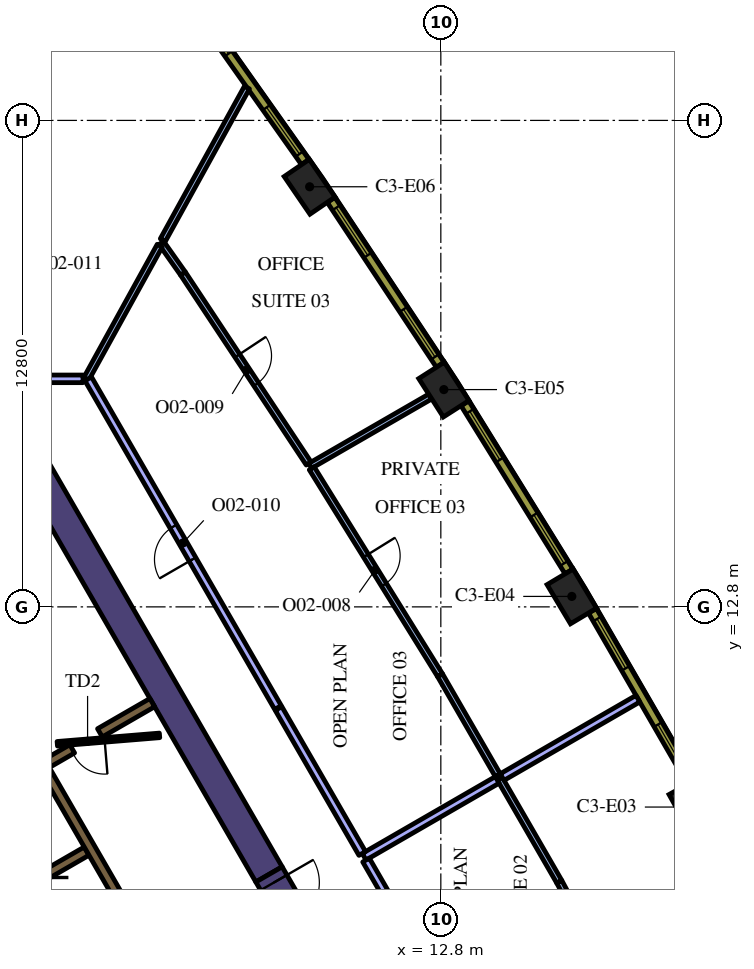
"""IFC4 building model, lengths in metres.
Left out: names, types, materials, properties, quantities, classifications, styles, units other than length and angle.
Written with IfcOpenShell. Run it as: python <this file> out.ifc"""

import sys

from ifc_helpers import new_model, si_unit, direction, frame, frame_2d, origin, origin_2d, place, context, subcontext, project, spatial, rectangle, extrude, element, fill, save


model = new_model("IFC4")
c1 = context("Model", 3, precision=1e-05, world=origin(), true_north=direction((0.0, 1.0)))
c2 = subcontext(c1, "Body", "Model", "MODEL_VIEW")
j1 = project(units=[si_unit("LENGTHUNIT", "METRE"), si_unit("PLANEANGLEUNIT", "RADIAN")], contexts=[c1])
p1 = place(None, origin())
s1 = spatial("IfcSite", under=j1, at=p1, CompositionType="ELEMENT")
p2 = place(p1, origin())
s2 = spatial("IfcBuilding", under=s1, at=p2, CompositionType="ELEMENT")
p3 = place(p2, frame((0.0, 0.0, 154.2)))
s3 = spatial("IfcBuildingStorey", under=s2, at=p3, CompositionType="ELEMENT", Elevation=154.2)
for number, where, z_axis, x_axis in (
    (1, (19.447, 7.533, 0.0), (0.0, 0.0, 1.0), (-0.487, 0.874, 0.0)),
    (2, (16.247, 13.075, 0.0), (0.0, 0.0, 1.0), (-0.513, 0.858, 0.0)),
    (3, (12.88, 18.517, 0.0), (0.0, 0.0, 1.0), (-0.539, 0.842, 0.0)),
    (4, (9.348, 23.854, 0.0), (0.0, 0.0, 1.0), (-0.565, 0.825, 0.0)),
):
    element("IfcColumn", number, at=place(p3, frame(where, z_axis=z_axis, x_axis=x_axis)), inside=s3, PredefinedType="COLUMN", context=c2, shape_type="SweptSolid", body=[
        extrude(rectangle(XDim=1.2, YDim=0.8, at=origin_2d()), origin(), (0.0, 0.0, 1.0), 4.2),
    ])
p4 = place(p3, frame((8.279, 5.761, 0.0), z_axis=(0.0, 0.0, 1.0), x_axis=(-0.500010359015, 0.866019422922, 0.0)))
e5 = element("IfcWall", 5, at=p4, inside=s3, PredefinedType="SOLIDWALL", context=c2, shape_type="SweptSolid", body=[
    extrude(rectangle(XDim=12.528, YDim=0.8, at=frame_2d((6.264, 0.0))), origin(), (0.0, 0.0, 1.0), 4.2),
])
p5 = place(p3, frame((6.568, -3.627, 0.0), z_axis=(0.0, 0.0, 1.0), x_axis=(-0.499999455981, 0.866025717874, 0.0)))
e6 = element("IfcWall", 6, at=p5, inside=s3, PredefinedType="SOLIDWALL", context=c2, shape_type="SweptSolid", body=[
    extrude(rectangle(XDim=11.978, YDim=0.25, at=frame_2d((5.989, 0.0))), origin(), (0.0, 0.0, 1.0), 4.2),
])
p6 = place(p3, frame((3.1, 9.064, 0.0), z_axis=(0.0, 0.0, 1.0), x_axis=(-0.866030133475, -0.499991807846, 0.0)))
e7 = element("IfcWall", 7, at=p6, inside=s3, PredefinedType="SOLIDWALL", context=c2, shape_type="SweptSolid", body=[
    extrude(rectangle(XDim=3.217, YDim=0.25, at=frame_2d((1.608, 0.0))), origin(), (0.0, 0.0, 1.0), 4.2),
])
p7 = place(p3, frame((1.574, 5.274, 0.0), z_axis=(0.0, 0.0, 1.0), x_axis=(0.866028486751, 0.499994660107, 0.0)))
e8 = element("IfcWall", 8, at=p7, inside=s3, PredefinedType="SOLIDWALL", context=c2, shape_type="SweptSolid", body=[
    extrude(rectangle(XDim=2.2, YDim=0.25, at=frame_2d((1.1, 0.0))), origin(), (0.0, 0.0, 1.0), 4.2),
])
p8 = place(p3, frame((3.83, 9.486, 0.0), z_axis=(0.0, 0.0, 1.0), x_axis=(0.865986202621, 0.500067892261, 0.0)))
e9 = element("IfcWall", 9, at=p8, inside=s3, PredefinedType="SOLIDWALL", context=c2, shape_type="SweptSolid", body=[
    extrude(rectangle(XDim=1.591, YDim=0.25, at=frame_2d((0.795, 0.0))), origin(), (0.0, 0.0, 1.0), 4.2),
])
p9 = place(p3, frame((8.565, -2.185, 0.0), z_axis=(0.0, 0.0, 1.0), x_axis=(-0.499997954832, 0.866026584559, 0.0)))
e10 = element("IfcWall", 10, at=p9, inside=s3, PredefinedType="SOLIDWALL", context=c2, shape_type="SweptSolid", body=[
    extrude(rectangle(XDim=12.35, YDim=0.25, at=frame_2d((6.175, 0.0))), origin(), (0.0, 0.0, 1.0), 4.2),
])
p10 = place(p9, frame((0.585, 0.0, 0.0)))
e11 = element("IfcOpeningElement", 11, at=p10, cuts=e10, PredefinedType="OPENING", context=c2, shape_type="SweptSolid", body=[
    extrude(rectangle(XDim=1.1, YDim=2.1, at=frame_2d((0.55, 1.05))), frame((0.0, 0.135, 0.0), z_axis=(0.0, -1.0, 0.0), x_axis=(1.0, 0.0, 0.0)), (0.0, 0.0, 1.0), 0.27),
])
p11 = place(p3, frame((5.398, 9.419, 0.0), z_axis=(0.0, 0.0, 1.0), x_axis=(-0.996653416376, -0.081743303248, 0.0)))
e12 = element("IfcWall", 12, at=p11, inside=s3, PredefinedType="PARTITIONING", context=c2, shape_type="SweptSolid", body=[
    extrude(rectangle(XDim=2.7, YDim=0.12, at=frame_2d((1.35, 0.0))), origin(), (0.0, 0.0, 1.0), 3.15),
])
p12 = place(p11, frame((1.45, 0.0, 0.0)))
e13 = element("IfcOpeningElement", 13, at=p12, cuts=e12, PredefinedType="OPENING", context=c2, shape_type="SweptSolid", body=[
    extrude(rectangle(XDim=0.9, YDim=2.1, at=frame_2d((0.45, 1.05))), frame((0.0, 0.07, 0.0), z_axis=(0.0, -1.0, 0.0), x_axis=(1.0, 0.0, 0.0)), (0.0, 0.0, 1.0), 0.14),
])
p13 = place(p3, frame((8.279, 5.761, 0.0), z_axis=(0.0, 0.0, 1.0), x_axis=(0.500062241894, -0.865989465428, 0.0)))
e14 = element("IfcWall", 14, at=p13, inside=s3, PredefinedType="SOLIDWALL", context=c2, shape_type="SweptSolid", body=[
    extrude(rectangle(XDim=1.7, YDim=0.8, at=frame_2d((0.85, 0.0))), origin(), (0.0, 0.0, 1.0), 4.2),
])
p14 = place(p13, frame((0.25, 0.0, 0.0)))
e15 = element("IfcOpeningElement", 15, at=p14, cuts=e14, PredefinedType="OPENING", context=c2, shape_type="SweptSolid", body=[
    extrude(rectangle(XDim=1.2, YDim=2.1, at=frame_2d((0.6, 1.05))), frame((0.0, 0.41, 0.0), z_axis=(0.0, -1.0, 0.0), x_axis=(1.0, 0.0, 0.0)), (0.0, 0.0, 1.0), 0.82),
])
p15 = place(p3, frame((15.917, 5.566, 0.0), z_axis=(0.0, 0.0, 1.0), x_axis=(0.472485737981, -0.881338316088, 0.0)))
e16 = element("IfcWall", 16, at=p15, inside=s3, PredefinedType="PARTITIONING", context=c2, shape_type="SweptSolid", body=[
    extrude(rectangle(XDim=6.407, YDim=0.15, at=frame_2d((3.204, 0.0))), origin(), (0.0, 0.0, 1.0), 3.15),
])
p16 = place(p15, frame((2.707, 0.0, 0.0)))
e17 = element("IfcOpeningElement", 17, at=p16, cuts=e16, PredefinedType="OPENING", context=c2, shape_type="SweptSolid", body=[
    extrude(rectangle(XDim=0.9, YDim=2.1, at=frame_2d((0.45, 1.05))), frame((0.0, 0.085, 0.0), z_axis=(0.0, -1.0, 0.0), x_axis=(1.0, 0.0, 0.0)), (0.0, 0.0, 1.0), 0.17),
])
p17 = place(p3, frame((15.917, 5.566, 0.0), z_axis=(0.0, 0.0, 1.0), x_axis=(-0.499996312652, 0.866027532665, 0.0)))
e18 = element("IfcWall", 18, at=p17, inside=s3, PredefinedType="PARTITIONING", context=c2, shape_type="SweptSolid", body=[
    extrude(rectangle(XDim=3.138, YDim=0.15, at=frame_2d((1.569, 0.0))), origin(), (0.0, 0.0, 1.0), 3.15),
])
p18 = place(p3, frame((14.413, 8.322, 0.0), z_axis=(0.0, 0.0, 1.0), x_axis=(0.866034795751, 0.499983732284, 0.0)))
e19 = element("IfcWall", 19, at=p18, inside=s3, PredefinedType="PARTITIONING", context=c2, shape_type="SweptSolid", body=[
    extrude(rectangle(XDim=4.125, YDim=0.2, at=frame_2d((2.062, 0.0))), origin(), (0.0, 0.0, 1.0), 3.15),
])
p19 = place(p3, frame((10.782, 6.225, 0.0), z_axis=(0.0, 0.0, 1.0), x_axis=(0.866034752867, 0.499983806564, 0.0)))
e20 = element("IfcWall", 20, at=p19, inside=s3, PredefinedType="PARTITIONING", context=c2, shape_type="SweptSolid", body=[
    extrude(rectangle(XDim=4.043, YDim=0.2, at=frame_2d((2.021, 0.0))), origin(), (0.0, 0.0, 1.0), 3.15),
])
p20 = place(p3, frame((13.032, 2.328, 0.0), z_axis=(0.0, 0.0, 1.0), x_axis=(-0.499988222896, 0.866032203192, 0.0)))
e21 = element("IfcWall", 21, at=p20, inside=s3, PredefinedType="PARTITIONING", context=c2, shape_type="SweptSolid", body=[
    extrude(rectangle(XDim=4.4, YDim=0.2, at=frame_2d((2.2, 0.0))), origin(), (0.0, 0.0, 1.0), 3.15),
])
p21 = place(p3, frame((9.363, 16.511, 0.0), z_axis=(0.0, 0.0, 1.0), x_axis=(0.866006134298, 0.500033374244, 0.0)))
e22 = element("IfcWall", 22, at=p21, inside=s3, PredefinedType="PARTITIONING", context=c2, shape_type="SweptSolid", body=[
    extrude(rectangle(XDim=3.648, YDim=0.15, at=frame_2d((1.824, 0.0))), origin(), (0.0, 0.0, 1.0), 3.15),
])
p22 = place(p3, frame((14.299, 8.371, 0.0), z_axis=(0.0, 0.0, 1.0), x_axis=(-0.500019211527, 0.86601431172, 0.0)))
e23 = element("IfcWall", 23, at=p22, inside=s3, PredefinedType="PARTITIONING", context=c2, shape_type="SweptSolid", body=[
    extrude(rectangle(XDim=3.039, YDim=0.15, at=frame_2d((1.519, 0.0))), origin(), (0.0, 0.0, 1.0), 3.15),
])
p23 = place(p3, frame((9.403, 16.447, 0.0), z_axis=(0.0, 0.0, 1.0), x_axis=(0.527026092571, -0.849849102929, 0.0)))
e24 = element("IfcWall", 24, at=p23, inside=s3, PredefinedType="PARTITIONING", context=c2, shape_type="SweptSolid", body=[
    extrude(rectangle(XDim=6.407, YDim=0.15, at=frame_2d((3.204, 0.0))), origin(), (0.0, 0.0, 1.0), 3.15),
])
p24 = place(p23, frame((2.707, 0.0, 0.0)))
e25 = element("IfcOpeningElement", 25, at=p24, cuts=e24, PredefinedType="OPENING", context=c2, shape_type="SweptSolid", body=[
    extrude(rectangle(XDim=0.9, YDim=2.1, at=frame_2d((0.45, 1.05))), frame((0.0, 0.085, 0.0), z_axis=(0.0, -1.0, 0.0), x_axis=(1.0, 0.0, 0.0)), (0.0, 0.0, 1.0), 0.17),
])
p25 = place(p3, frame((6.013, 21.573, 0.0), z_axis=(0.0, 0.0, 1.0), x_axis=(0.551906048292, -0.833906298009, 0.0)))
e26 = element("IfcWall", 26, at=p25, inside=s3, PredefinedType="PARTITIONING", context=c2, shape_type="SweptSolid", body=[
    extrude(rectangle(XDim=5.995, YDim=0.15, at=frame_2d((2.998, 0.0))), origin(), (0.0, 0.0, 1.0), 3.15),
])
p26 = place(p25, frame((2.595, 0.0, 0.0)))
e27 = element("IfcOpeningElement", 27, at=p26, cuts=e26, PredefinedType="OPENING", context=c2, shape_type="SweptSolid", body=[
    extrude(rectangle(XDim=0.9, YDim=2.1, at=frame_2d((0.45, 1.05))), frame((0.0, 0.085, 0.0), z_axis=(0.0, -1.0, 0.0), x_axis=(1.0, 0.0, 0.0)), (0.0, 0.0, 1.0), 0.17),
])
p27 = place(p3, frame((6.013, 21.573, 0.0), z_axis=(0.0, 0.0, 1.0), x_axis=(-0.576965221715, 0.816768714467, 0.0)))
e28 = element("IfcWall", 28, at=p27, inside=s3, PredefinedType="PARTITIONING", context=c2, shape_type="SweptSolid", body=[
    extrude(rectangle(XDim=0.986, YDim=0.15, at=frame_2d((0.493, 0.0))), origin(), (0.0, 0.0, 1.0), 3.15),
])
p28 = place(p3, frame((5.484, 22.451, 0.0), z_axis=(0.0, 0.0, 1.0), x_axis=(0.483018213307, 0.875610304652, 0.0)))
e29 = element("IfcWall", 29, at=p28, inside=s3, PredefinedType="PARTITIONING", context=c2, shape_type="SweptSolid", body=[
    extrude(rectangle(XDim=4.584, YDim=0.15, at=frame_2d((2.292, 0.0))), origin(), (0.0, 0.0, 1.0), 3.15),
])
p29 = place(p3, frame((3.47, 18.8, 0.0), z_axis=(0.0, 0.0, 1.0), x_axis=(0.483004783308, 0.87561771299, 0.0)))
e30 = element("IfcWall", 30, at=p29, inside=s3, PredefinedType="PARTITIONING", context=c2, shape_type="SweptSolid", body=[
    extrude(rectangle(XDim=4.003, YDim=0.15, at=frame_2d((2.001, 0.0))), origin(), (0.0, 0.0, 1.0), 3.15),
])
p30 = place(p3, frame((10.732, 6.312, 0.0), z_axis=(0.0, 0.0, 1.0), x_axis=(-0.499984786451, 0.866034187153, 0.0)))
e31 = element("IfcWall", 31, at=p30, inside=s3, PredefinedType="PARTITIONING", context=c2, shape_type="SweptSolid", body=[
    extrude(rectangle(XDim=4.404, YDim=0.2, at=frame_2d((2.202, 0.0))), origin(), (0.0, 0.0, 1.0), 3.15),
])
p31 = place(p3, frame((8.515, 10.152, 0.0), z_axis=(0.0, 0.0, 1.0), x_axis=(-0.499998974385, 0.866025995923, 0.0)))
e32 = element("IfcWall", 32, at=p31, inside=s3, PredefinedType="PARTITIONING", context=c2, shape_type="SweptSolid", body=[
    extrude(rectangle(XDim=9.986, YDim=0.2, at=frame_2d((4.993, 0.0))), origin(), (0.0, 0.0, 1.0), 3.15),
])
p32 = place(p31, frame((4.5, 0.0, 0.0)))
e33 = element("IfcOpeningElement", 33, at=p32, cuts=e32, PredefinedType="OPENING", context=c2, shape_type="SweptSolid", body=[
    extrude(rectangle(XDim=1.0, YDim=2.1, at=frame_2d((0.5, 1.05))), frame((0.0, 0.11, 0.0), z_axis=(0.0, -1.0, 0.0), x_axis=(1.0, 0.0, 0.0)), (0.0, 0.0, 1.0), 0.22),
])
p33 = place(p3, frame((3.385, 18.8, 0.0), z_axis=(0.0, 0.0, 1.0), x_axis=(-1.0, 0.0, 0.0)))
e34 = element("IfcWall", 34, at=p33, inside=s3, PredefinedType="PARTITIONING", context=c2, shape_type="SweptSolid", body=[
    extrude(rectangle(XDim=2.185, YDim=0.2, at=frame_2d((1.092, 0.0))), origin(), (0.0, 0.0, 1.0), 3.15),
])
p34 = place(p3, frame((19.391, 8.191, 0.0), z_axis=(0.0, 0.0, 1.0), x_axis=(-0.500009456303, 0.866019944116, 0.0)))
e35 = element("IfcWall", 35, at=p34, inside=s3, PredefinedType="SOLIDWALL", context=c2, shape_type="SweptSolid", body=[
    extrude(rectangle(XDim=5.204, YDim=0.24, at=frame_2d((2.602, 0.0))), origin(), (0.0, 0.0, 1.0), 3.95),
])
p35 = place(p34, frame((0.248, 0.0, 0.9)))
e36 = element("IfcOpeningElement", 36, at=p35, cuts=e35, PredefinedType="OPENING", context=c2, shape_type="SweptSolid", body=[
    extrude(rectangle(XDim=1.5, YDim=2.55, at=frame_2d((0.75, 1.275))), frame((0.0, 0.13, 0.0), z_axis=(0.0, -1.0, 0.0), x_axis=(1.0, 0.0, 0.0)), (0.0, 0.0, 1.0), 0.26),
])
p36 = place(p34, frame((3.455, 0.0, 0.9)))
e37 = element("IfcOpeningElement", 37, at=p36, cuts=e35, PredefinedType="OPENING", context=c2, shape_type="SweptSolid", body=[
    extrude(rectangle(XDim=1.5, YDim=2.55, at=frame_2d((0.75, 1.275))), frame((0.0, 0.13, 0.0), z_axis=(0.0, -1.0, 0.0), x_axis=(1.0, 0.0, 0.0)), (0.0, 0.0, 1.0), 0.26),
])
p37 = place(p3, frame((16.171, 13.731, 0.0), z_axis=(0.0, 0.0, 1.0), x_axis=(-0.526197926587, 0.850362124072, 0.0)))
e38 = element("IfcWall", 38, at=p37, inside=s3, PredefinedType="SOLIDWALL", context=c2, shape_type="SweptSolid", body=[
    extrude(rectangle(XDim=5.203, YDim=0.24, at=frame_2d((2.602, 0.0))), origin(), (0.0, 0.0, 1.0), 3.95),
])
p38 = place(p37, frame((0.248, 0.0, 0.9)))
e39 = element("IfcOpeningElement", 39, at=p38, cuts=e38, PredefinedType="OPENING", context=c2, shape_type="SweptSolid", body=[
    extrude(rectangle(XDim=1.5, YDim=2.55, at=frame_2d((0.75, 1.275))), frame((0.0, 0.13, 0.0), z_axis=(0.0, -1.0, 0.0), x_axis=(1.0, 0.0, 0.0)), (0.0, 0.0, 1.0), 0.26),
])
p39 = place(p37, frame((3.455, 0.0, 0.9)))
e40 = element("IfcOpeningElement", 40, at=p39, cuts=e38, PredefinedType="OPENING", context=c2, shape_type="SweptSolid", body=[
    extrude(rectangle(XDim=1.5, YDim=2.55, at=frame_2d((0.75, 1.275))), frame((0.0, 0.13, 0.0), z_axis=(0.0, -1.0, 0.0), x_axis=(1.0, 0.0, 0.0)), (0.0, 0.0, 1.0), 0.26),
])
p40 = place(p3, frame((12.783, 19.171, 0.0), z_axis=(0.0, 0.0, 1.0), x_axis=(-0.551892811511, 0.833915058386, 0.0)))
e41 = element("IfcWall", 41, at=p40, inside=s3, PredefinedType="SOLIDWALL", context=c2, shape_type="SweptSolid", body=[
    extrude(rectangle(XDim=5.204, YDim=0.24, at=frame_2d((2.602, 0.0))), origin(), (0.0, 0.0, 1.0), 3.95),
])
p41 = place(p40, frame((0.248, 0.0, 0.9)))
e42 = element("IfcOpeningElement", 42, at=p41, cuts=e41, PredefinedType="OPENING", context=c2, shape_type="SweptSolid", body=[
    extrude(rectangle(XDim=1.5, YDim=2.55, at=frame_2d((0.75, 1.275))), frame((0.0, 0.13, 0.0), z_axis=(0.0, -1.0, 0.0), x_axis=(1.0, 0.0, 0.0)), (0.0, 0.0, 1.0), 0.26),
])
p42 = place(p40, frame((3.455, 0.0, 0.9)))
e43 = element("IfcOpeningElement", 43, at=p42, cuts=e41, PredefinedType="OPENING", context=c2, shape_type="SweptSolid", body=[
    extrude(rectangle(XDim=1.5, YDim=2.55, at=frame_2d((0.75, 1.275))), frame((0.0, 0.13, 0.0), z_axis=(0.0, -1.0, 0.0), x_axis=(1.0, 0.0, 0.0)), (0.0, 0.0, 1.0), 0.26),
])
p43 = place(p3, frame((9.231, 24.504, 0.0), z_axis=(0.0, 0.0, 1.0), x_axis=(-0.577115207679, 0.816662743772, 0.0)))
e44 = element("IfcWall", 44, at=p43, inside=s3, PredefinedType="SOLIDWALL", context=c2, shape_type="SweptSolid", body=[
    extrude(rectangle(XDim=5.213, YDim=0.24, at=frame_2d((2.606, 0.0))), origin(), (0.0, 0.0, 1.0), 3.95),
])
p44 = place(p43, frame((0.261, 0.0, 0.9)))
e45 = element("IfcOpeningElement", 45, at=p44, cuts=e44, PredefinedType="OPENING", context=c2, shape_type="SweptSolid", body=[
    extrude(rectangle(XDim=1.5, YDim=2.55, at=frame_2d((0.75, 1.275))), frame((0.0, 0.13, 0.0), z_axis=(0.0, -1.0, 0.0), x_axis=(1.0, 0.0, 0.0)), (0.0, 0.0, 1.0), 0.26),
])
p45 = place(p43, frame((3.492, 0.0, 0.9)))
e46 = element("IfcOpeningElement", 46, at=p45, cuts=e44, PredefinedType="OPENING", context=c2, shape_type="SweptSolid", body=[
    extrude(rectangle(XDim=1.5, YDim=2.55, at=frame_2d((0.75, 1.275))), frame((0.0, 0.13, 0.0), z_axis=(0.0, -1.0, 0.0), x_axis=(1.0, 0.0, 0.0)), (0.0, 0.0, 1.0), 0.26),
])
p46 = place(p12, origin())
e47 = element("IfcDoor", 47, at=p46, inside=s3, OperationType="SINGLE_SWING_LEFT", PredefinedType="DOOR", context=c2, shape_type="SweptSolid", body=[
    extrude(rectangle(XDim=0.9, YDim=2.1, at=frame_2d((0.45, 1.05))), frame((0.0, 0.025, 0.0), z_axis=(0.0, -1.0, 0.0), x_axis=(1.0, 0.0, 0.0)), (0.0, 0.0, 1.0), 0.05),
])
fill(e13, e47)
p47 = place(p14, origin())
e48 = element("IfcDoor", 48, at=p47, inside=s3, OperationType="SINGLE_SWING_LEFT", PredefinedType="DOOR", context=c2, shape_type="SweptSolid", body=[
    extrude(rectangle(XDim=1.2, YDim=2.1, at=frame_2d((0.6, 1.05))), frame((0.0, 0.025, 0.0), z_axis=(0.0, -1.0, 0.0), x_axis=(1.0, 0.0, 0.0)), (0.0, 0.0, 1.0), 0.05),
])
fill(e15, e48)
p48 = place(p24, origin())
e49 = element("IfcDoor", 49, at=p48, inside=s3, OperationType="SINGLE_SWING_LEFT", PredefinedType="DOOR", context=c2, shape_type="SweptSolid", body=[
    extrude(rectangle(XDim=0.9, YDim=2.1, at=frame_2d((0.45, 1.05))), frame((0.0, 0.025, 0.0), z_axis=(0.0, -1.0, 0.0), x_axis=(1.0, 0.0, 0.0)), (0.0, 0.0, 1.0), 0.05),
])
fill(e25, e49)
p49 = place(p26, origin())
e50 = element("IfcDoor", 50, at=p49, inside=s3, OperationType="SINGLE_SWING_RIGHT", PredefinedType="DOOR", context=c2, shape_type="SweptSolid", body=[
    extrude(rectangle(XDim=0.9, YDim=2.1, at=frame_2d((0.45, 1.05))), frame((0.0, 0.025, 0.0), z_axis=(0.0, -1.0, 0.0), x_axis=(1.0, 0.0, 0.0)), (0.0, 0.0, 1.0), 0.05),
])
fill(e27, e50)
p50 = place(p32, origin())
e51 = element("IfcDoor", 51, at=p50, inside=s3, OperationType="SINGLE_SWING_RIGHT", PredefinedType="DOOR", context=c2, shape_type="SweptSolid", body=[
    extrude(rectangle(XDim=1.0, YDim=2.1, at=frame_2d((0.5, 1.05))), frame((0.0, 0.025, 0.0), z_axis=(0.0, -1.0, 0.0), x_axis=(1.0, 0.0, 0.0)), (0.0, 0.0, 1.0), 0.05),
])
fill(e33, e51)
p51 = place(p35, origin())
e52 = element("IfcWindow", 52, at=p51, inside=s3, PartitioningType="SINGLE_PANEL", PredefinedType="WINDOW", context=c2, shape_type="SweptSolid", body=[
    extrude(rectangle(XDim=1.5, YDim=2.55, at=frame_2d((0.75, 1.275))), frame((0.0, 0.04, 0.0), z_axis=(0.0, -1.0, 0.0), x_axis=(1.0, 0.0, 0.0)), (0.0, 0.0, 1.0), 0.06),
])
fill(e36, e52)
p52 = place(p36, origin())
e53 = element("IfcWindow", 53, at=p52, inside=s3, PartitioningType="SINGLE_PANEL", PredefinedType="WINDOW", context=c2, shape_type="SweptSolid", body=[
    extrude(rectangle(XDim=1.5, YDim=2.55, at=frame_2d((0.75, 1.275))), frame((0.0, 0.04, 0.0), z_axis=(0.0, -1.0, 0.0), x_axis=(1.0, 0.0, 0.0)), (0.0, 0.0, 1.0), 0.06),
])
fill(e37, e53)
p53 = place(p38, origin())
e54 = element("IfcWindow", 54, at=p53, inside=s3, PartitioningType="SINGLE_PANEL", PredefinedType="WINDOW", context=c2, shape_type="SweptSolid", body=[
    extrude(rectangle(XDim=1.5, YDim=2.55, at=frame_2d((0.75, 1.275))), frame((0.0, 0.04, 0.0), z_axis=(0.0, -1.0, 0.0), x_axis=(1.0, 0.0, 0.0)), (0.0, 0.0, 1.0), 0.06),
])
fill(e39, e54)
p54 = place(p39, origin())
e55 = element("IfcWindow", 55, at=p54, inside=s3, PartitioningType="SINGLE_PANEL", PredefinedType="WINDOW", context=c2, shape_type="SweptSolid", body=[
    extrude(rectangle(XDim=1.5, YDim=2.55, at=frame_2d((0.75, 1.275))), frame((0.0, 0.04, 0.0), z_axis=(0.0, -1.0, 0.0), x_axis=(1.0, 0.0, 0.0)), (0.0, 0.0, 1.0), 0.06),
])
fill(e40, e55)
p55 = place(p41, origin())
e56 = element("IfcWindow", 56, at=p55, inside=s3, PartitioningType="SINGLE_PANEL", PredefinedType="WINDOW", context=c2, shape_type="SweptSolid", body=[
    extrude(rectangle(XDim=1.5, YDim=2.55, at=frame_2d((0.75, 1.275))), frame((0.0, 0.04, 0.0), z_axis=(0.0, -1.0, 0.0), x_axis=(1.0, 0.0, 0.0)), (0.0, 0.0, 1.0), 0.06),
])
fill(e42, e56)
p56 = place(p42, origin())
e57 = element("IfcWindow", 57, at=p56, inside=s3, PartitioningType="SINGLE_PANEL", PredefinedType="WINDOW", context=c2, shape_type="SweptSolid", body=[
    extrude(rectangle(XDim=1.5, YDim=2.55, at=frame_2d((0.75, 1.275))), frame((0.0, 0.04, 0.0), z_axis=(0.0, -1.0, 0.0), x_axis=(1.0, 0.0, 0.0)), (0.0, 0.0, 1.0), 0.06),
])
fill(e43, e57)
p57 = place(p44, origin())
e58 = element("IfcWindow", 58, at=p57, inside=s3, PartitioningType="SINGLE_PANEL", PredefinedType="WINDOW", context=c2, shape_type="SweptSolid", body=[
    extrude(rectangle(XDim=1.5, YDim=2.55, at=frame_2d((0.75, 1.275))), frame((0.0, 0.04, 0.0), z_axis=(0.0, -1.0, 0.0), x_axis=(1.0, 0.0, 0.0)), (0.0, 0.0, 1.0), 0.06),
])
fill(e45, e58)
p58 = place(p45, origin())
e59 = element("IfcWindow", 59, at=p58, inside=s3, PartitioningType="SINGLE_PANEL", PredefinedType="WINDOW", context=c2, shape_type="SweptSolid", body=[
    extrude(rectangle(XDim=1.5, YDim=2.55, at=frame_2d((0.75, 1.275))), frame((0.0, 0.04, 0.0), z_axis=(0.0, -1.0, 0.0), x_axis=(1.0, 0.0, 0.0)), (0.0, 0.0, 1.0), 0.06),
])
fill(e46, e59)
save(model, sys.argv[1])
